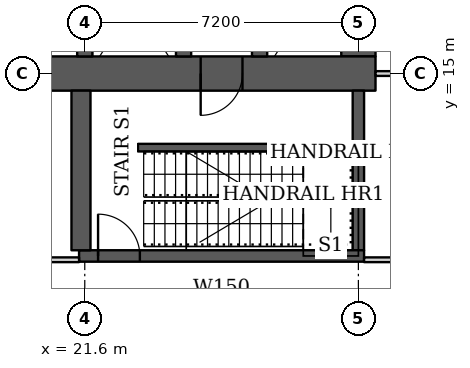
"""IFC4 building model, lengths in metres.
Left out: names, types, materials, properties, quantities, classifications, styles, units other than length and angle.
Written with IfcOpenShell. Run it as: python <this file> out.ifc"""

import sys

from ifc_helpers import new_model, si_unit, direction, frame, frame_2d, origin, place, context, subcontext, project, spatial, rectangle, extrude, element, fill, save


model = new_model("IFC4")
c1 = context("Model", 3, precision=1e-05, world=origin(), true_north=direction((0.0, 1.0)))
c2 = subcontext(c1, "Body", "Model", "MODEL_VIEW")
j1 = project(units=[si_unit("LENGTHUNIT", "METRE"), si_unit("PLANEANGLEUNIT", "RADIAN")], contexts=[c1])
p1 = place(None, origin())
s1 = spatial("IfcSite", under=j1, at=p1, CompositionType="ELEMENT")
p2 = place(p1, origin())
s2 = spatial("IfcBuilding", under=s1, at=p2, CompositionType="ELEMENT")
p3 = place(p2, origin())
s3 = spatial("IfcBuildingStorey", under=s2, at=p3, CompositionType="ELEMENT", Elevation=0.0)
p4 = place(p3, frame((13.95, 15.0, 0.0), z_axis=(0.0, 0.0, 1.0), x_axis=(1.0, 0.0, 0.0)))
e1 = element("IfcWall", 1, at=p4, inside=s3, PredefinedType="SHEAR", context=c2, shape_type="SweptSolid", body=[
    extrude(rectangle(XDim=15.3, YDim=0.9, at=frame_2d((7.65, 0.0))), origin(), (0.0, 0.0, 1.0), 5.6),
])
p5 = place(p4, frame((4.45, 0.0, 0.0)))
e2 = element("IfcOpeningElement", 2, at=p5, cuts=e1, PredefinedType="OPENING", context=c2, shape_type="SweptSolid", body=[
    extrude(rectangle(XDim=1.8, YDim=2.1, at=frame_2d((0.9, 1.05))), frame((0.0, 0.46, 0.0), z_axis=(0.0, -1.0, 0.0), x_axis=(1.0, 0.0, 0.0)), (0.0, 0.0, 1.0), 0.92),
])
p6 = place(p4, frame((10.7, 0.0, 0.0)))
e3 = element("IfcOpeningElement", 3, at=p6, cuts=e1, PredefinedType="OPENING", context=c2, shape_type="SweptSolid", body=[
    extrude(rectangle(XDim=1.1, YDim=2.1, at=frame_2d((0.55, 1.05))), frame((0.0, 0.46, 0.0), z_axis=(0.0, -1.0, 0.0), x_axis=(1.0, 0.0, 0.0)), (0.0, 0.0, 1.0), 0.92),
])
p7 = place(p3, frame((28.8, 15.45, 0.0), z_axis=(0.0, 0.0, 1.0), x_axis=(0.0, 1.0, 0.0)))
e4 = element("IfcWall", 4, at=p7, inside=s3, PredefinedType="SHEAR", context=c2, shape_type="SweptSolid", body=[
    extrude(rectangle(XDim=14.1, YDim=0.9, at=frame_2d((7.05, 0.0))), origin(), (0.0, 0.0, 1.0), 5.6),
])
p8 = place(p3, frame((21.6, 15.45, 0.0), z_axis=(0.0, 0.0, 1.0), x_axis=(0.0, 1.0, 0.0)))
e5 = element("IfcWall", 5, at=p8, inside=s3, PredefinedType="SHEAR", context=c2, shape_type="SweptSolid", body=[
    extrude(rectangle(XDim=14.1, YDim=0.4, at=frame_2d((7.05, 0.0))), origin(), (0.0, 0.0, 1.0), 5.6),
])
p9 = place(p8, frame((0.875, 0.0, 0.0)))
e6 = element("IfcOpeningElement", 6, at=p9, cuts=e5, PredefinedType="OPENING", context=c2, shape_type="SweptSolid", body=[
    extrude(rectangle(XDim=1.1, YDim=2.1, at=frame_2d((0.55, 1.05))), frame((0.0, 0.21, 0.0), z_axis=(0.0, -1.0, 0.0), x_axis=(1.0, 0.0, 0.0)), (0.0, 0.0, 1.0), 0.42),
])
p10 = place(p8, frame((4.625, 0.0, 0.0)))
e7 = element("IfcOpeningElement", 7, at=p10, cuts=e5, PredefinedType="OPENING", context=c2, shape_type="SweptSolid", body=[
    extrude(rectangle(XDim=1.1, YDim=2.1, at=frame_2d((0.55, 1.05))), frame((0.0, 0.21, 0.0), z_axis=(0.0, -1.0, 0.0), x_axis=(1.0, 0.0, 0.0)), (0.0, 0.0, 1.0), 0.42),
])
p11 = place(p8, frame((8.375, 0.0, 0.0)))
e8 = element("IfcOpeningElement", 8, at=p11, cuts=e5, PredefinedType="OPENING", context=c2, shape_type="SweptSolid", body=[
    extrude(rectangle(XDim=1.1, YDim=2.1, at=frame_2d((0.55, 1.05))), frame((0.0, 0.21, 0.0), z_axis=(0.0, -1.0, 0.0), x_axis=(1.0, 0.0, 0.0)), (0.0, 0.0, 1.0), 0.42),
])
p12 = place(p8, frame((12.125, 0.0, 0.0)))
e9 = element("IfcOpeningElement", 9, at=p12, cuts=e5, PredefinedType="OPENING", context=c2, shape_type="SweptSolid", body=[
    extrude(rectangle(XDim=1.1, YDim=2.1, at=frame_2d((0.55, 1.05))), frame((0.0, 0.21, 0.0), z_axis=(0.0, -1.0, 0.0), x_axis=(1.0, 0.0, 0.0)), (0.0, 0.0, 1.0), 0.42),
])
p13 = place(p3, frame((24.2, 15.45, 0.0), z_axis=(0.0, 0.0, 1.0), x_axis=(0.0, 1.0, 0.0)))
e10 = element("IfcWall", 10, at=p13, inside=s3, PredefinedType="SHEAR", context=c2, shape_type="SweptSolid", body=[
    extrude(rectangle(XDim=14.1, YDim=0.4, at=frame_2d((7.05, 0.0))), origin(), (0.0, 0.0, 1.0), 5.6),
])
p14 = place(p3, frame((26.2, 15.45, 0.0), z_axis=(0.0, 0.0, 1.0), x_axis=(0.0, 1.0, 0.0)))
e11 = element("IfcWall", 11, at=p14, inside=s3, PredefinedType="SHEAR", context=c2, shape_type="SweptSolid", body=[
    extrude(rectangle(XDim=3.1, YDim=0.4, at=frame_2d((1.55, 0.0))), origin(), (0.0, 0.0, 1.0), 5.6),
])
p15 = place(p14, frame((0.825, 0.0, 0.0)))
e12 = element("IfcOpeningElement", 12, at=p15, cuts=e11, PredefinedType="OPENING", context=c2, shape_type="SweptSolid", body=[
    extrude(rectangle(XDim=1.2, YDim=2.1, at=frame_2d((0.6, 1.05))), frame((0.0, 0.21, 0.0), z_axis=(0.0, -1.0, 0.0), x_axis=(1.0, 0.0, 0.0)), (0.0, 0.0, 1.0), 0.42),
])
p16 = place(p3, frame((21.45, 10.2, 0.0), z_axis=(0.0, 0.0, 1.0), x_axis=(1.0, 0.0, 0.0)))
e13 = element("IfcWall", 13, at=p16, inside=s3, PredefinedType="SHEAR", context=c2, shape_type="SweptSolid", body=[
    extrude(rectangle(XDim=7.5, YDim=0.3, at=frame_2d((3.75, 0.0))), origin(), (0.0, 0.0, 1.0), 5.6),
])
p17 = place(p16, frame((0.5, 0.0, 0.0)))
e14 = element("IfcOpeningElement", 14, at=p17, cuts=e13, PredefinedType="OPENING", context=c2, shape_type="SweptSolid", body=[
    extrude(rectangle(XDim=1.1, YDim=2.1, at=frame_2d((0.55, 1.05))), frame((0.0, 0.16, 0.0), z_axis=(0.0, -1.0, 0.0), x_axis=(1.0, 0.0, 0.0)), (0.0, 0.0, 1.0), 0.32),
])
p18 = place(p3, frame((21.5, 10.35, 0.0), z_axis=(0.0, 0.0, 1.0), x_axis=(0.0, 1.0, 0.0)))
e15 = element("IfcWall", 15, at=p18, inside=s3, PredefinedType="SHEAR", context=c2, shape_type="SweptSolid", body=[
    extrude(rectangle(XDim=4.2, YDim=0.5, at=frame_2d((2.1, 0.0))), origin(), (0.0, 0.0, 1.0), 5.6),
])
p19 = place(p3, frame((28.8, 10.35, 0.0), z_axis=(0.0, 0.0, 1.0), x_axis=(0.0, 1.0, 0.0)))
e16 = element("IfcWall", 16, at=p19, inside=s3, PredefinedType="SHEAR", context=c2, shape_type="SweptSolid", body=[
    extrude(rectangle(XDim=4.2, YDim=0.3, at=frame_2d((2.1, 0.0))), origin(), (0.0, 0.0, 1.0), 5.6),
])
p20 = place(p3, frame((10.163, 10.1, 0.0), z_axis=(0.0, 0.0, 1.0), x_axis=(1.0, 0.0, 0.0)))
e17 = element("IfcWall", 17, at=p20, inside=s3, PredefinedType="PARTITIONING", context=c2, shape_type="SweptSolid", body=[
    extrude(rectangle(XDim=11.287, YDim=0.125, at=frame_2d((5.644, 0.0))), origin(), (0.0, 0.0, 1.0), 3.3),
])
p21 = place(p20, frame((7.832, 0.0, 0.0)))
e18 = element("IfcOpeningElement", 18, at=p21, cuts=e17, PredefinedType="OPENING", context=c2, shape_type="SweptSolid", body=[
    extrude(rectangle(XDim=1.8, YDim=2.1, at=frame_2d((0.9, 1.05))), frame((0.0, 0.073, 0.0), z_axis=(0.0, -1.0, 0.0), x_axis=(1.0, 0.0, 0.0)), (0.0, 0.0, 1.0), 0.145),
])
p22 = place(p3, frame((28.95, 10.1, 0.0), z_axis=(0.0, 0.0, 1.0), x_axis=(1.0, 0.0, 0.0)))
e19 = element("IfcWall", 19, at=p22, inside=s3, PredefinedType="PARTITIONING", context=c2, shape_type="SweptSolid", body=[
    extrude(rectangle(XDim=9.188, YDim=0.125, at=frame_2d((4.594, 0.0))), origin(), (0.0, 0.0, 1.0), 3.3),
])
p23 = place(p3, frame((29.25, 15.0, 0.0), z_axis=(0.0, 0.0, 1.0), x_axis=(1.0, 0.0, 0.0)))
e20 = element("IfcWall", 20, at=p23, inside=s3, PredefinedType="PARTITIONING", context=c2, shape_type="SweptSolid", body=[
    extrude(rectangle(XDim=5.549, YDim=0.125, at=frame_2d((2.774, 0.0))), origin(), (0.0, 0.0, 1.0), 5.3),
])
p24 = place(p3, frame((23.0, 13.05, 0.0), z_axis=(0.0, 0.0, 1.0), x_axis=(1.0, 0.0, 0.0)))
e21 = element("IfcWall", 21, at=p24, inside=s3, PredefinedType="SHEAR", context=c2, shape_type="SweptSolid", body=[
    extrude(rectangle(XDim=5.8, YDim=0.2, at=frame_2d((2.9, 0.0))), origin(), (0.0, 0.0, 1.0), 5.6),
])
p25 = place(p6, origin())
e22 = element("IfcDoor", 22, at=p25, inside=s3, OperationType="SINGLE_SWING_RIGHT", PredefinedType="DOOR", context=c2, shape_type="SweptSolid", body=[
    extrude(rectangle(XDim=1.1, YDim=2.1, at=frame_2d((0.55, 1.05))), frame((0.0, 0.025, 0.0), z_axis=(0.0, -1.0, 0.0), x_axis=(1.0, 0.0, 0.0)), (0.0, 0.0, 1.0), 0.05),
])
fill(e3, e22)
p26 = place(p17, origin())
e23 = element("IfcDoor", 23, at=p26, inside=s3, OperationType="SINGLE_SWING_LEFT", PredefinedType="DOOR", context=c2, shape_type="SweptSolid", body=[
    extrude(rectangle(XDim=1.1, YDim=2.1, at=frame_2d((0.55, 1.05))), frame((0.0, 0.025, 0.0), z_axis=(0.0, -1.0, 0.0), x_axis=(1.0, 0.0, 0.0)), (0.0, 0.0, 1.0), 0.05),
])
fill(e14, e23)
save(model, sys.argv[1])
